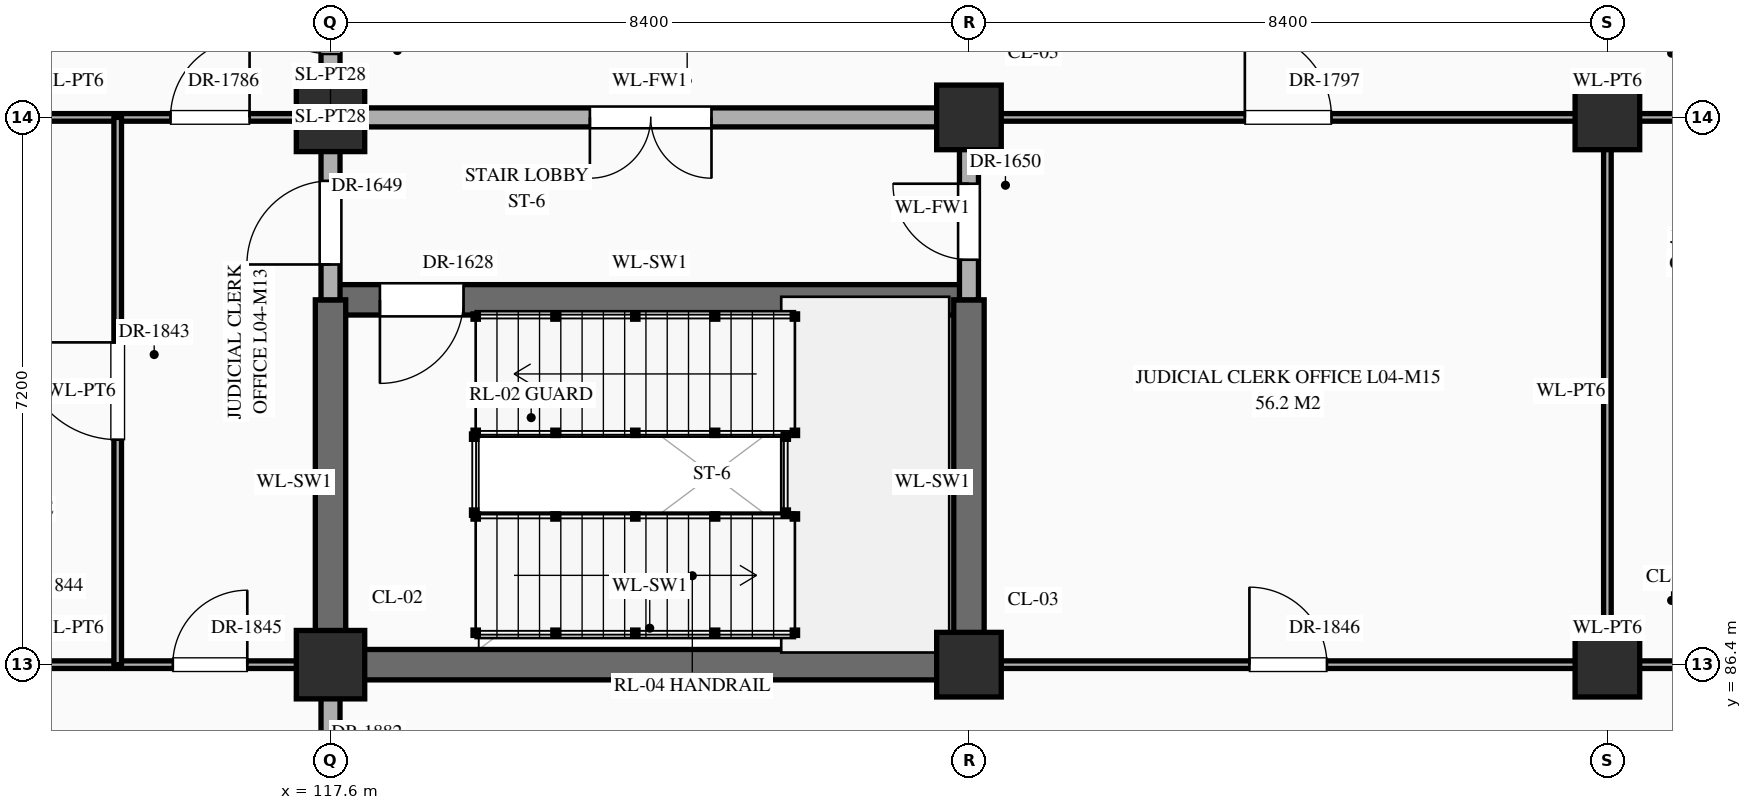
"""IFC4 building model, lengths in metres.
Left out: names, types, materials, properties, quantities, classifications, styles, units other than length and angle.
Written with IfcOpenShell. Run it as: python <this file> out.ifc"""

import sys

from ifc_helpers import new_model, si_unit, direction, frame, frame_2d, origin, origin_2d, place, context, subcontext, project, spatial, rectangle, extrude, element, fill, save


model = new_model("IFC4")
c1 = context("Model", 3, precision=1e-05, world=origin(), true_north=direction((0.0, 1.0)))
c2 = subcontext(c1, "Body", "Model", "MODEL_VIEW")
j1 = project(units=[si_unit("LENGTHUNIT", "METRE"), si_unit("PLANEANGLEUNIT", "RADIAN")], contexts=[c1])
p1 = place(None, origin())
s1 = spatial("IfcSite", under=j1, at=p1, CompositionType="ELEMENT")
p2 = place(p1, origin())
s2 = spatial("IfcBuilding", under=s1, at=p2, CompositionType="ELEMENT")
p3 = place(p2, frame((0.0, 0.0, 16.2)))
s3 = spatial("IfcBuildingStorey", under=s2, at=p3, CompositionType="ELEMENT", Elevation=16.2)
for number, where, z_axis, x_axis in (
    (1, (117.6, 86.4, 0.0), (0.0, 0.0, 1.0), (1.0, 0.0, 0.0)),
    (2, (117.6, 93.6, 0.0), (0.0, 0.0, 1.0), (1.0, 0.0, 0.0)),
):
    element("IfcColumn", number, at=place(p3, frame(where, z_axis=z_axis, x_axis=x_axis)), inside=s3, PredefinedType="COLUMN", context=c2, shape_type="SweptSolid", body=[
        extrude(rectangle(XDim=0.9, YDim=0.9, at=origin_2d()), origin(), (0.0, 0.0, 1.0), 5.4),
    ])
for number, where, z_axis, x_axis in (
    (3, (126.0, 86.4, 0.0), (0.0, 0.0, 1.0), (1.0, 0.0, 0.0)),
    (4, (126.0, 93.6, 0.0), (0.0, 0.0, 1.0), (1.0, 0.0, 0.0)),
    (5, (134.4, 86.4, 0.0), (0.0, 0.0, 1.0), (1.0, 0.0, 0.0)),
    (6, (134.4, 93.6, 0.0), (0.0, 0.0, 1.0), (1.0, 0.0, 0.0)),
):
    element("IfcColumn", number, at=place(p3, frame(where, z_axis=z_axis, x_axis=x_axis)), inside=s3, PredefinedType="COLUMN", context=c2, shape_type="SweptSolid", body=[
        extrude(rectangle(XDim=0.85, YDim=0.85, at=origin_2d()), origin(), (0.0, 0.0, 1.0), 5.4),
    ])
p4 = place(p3, frame((109.2, 86.4, 0.0), z_axis=(0.0, 0.0, 1.0), x_axis=(1.0, 0.0, 0.0)))
e7 = element("IfcWall", 7, at=p4, inside=s3, PredefinedType="STANDARD", context=c2, shape_type="SweptSolid", body=[
    extrude(rectangle(XDim=8.4, YDim=0.1, at=frame_2d((4.2, 0.0))), origin(), (0.0, 0.0, 1.0), 4.27),
])
p5 = place(p4, frame((0.965, 0.0, 0.0)))
e8 = element("IfcOpeningElement", 8, at=p5, cuts=e7, PredefinedType="OPENING", context=c2, shape_type="SweptSolid", body=[
    extrude(rectangle(XDim=1.24, YDim=2.3, at=frame_2d((0.62, 1.15))), frame((0.0, 0.062, 0.0), z_axis=(0.0, -1.0, 0.0), x_axis=(1.0, 0.0, 0.0)), (0.0, 0.0, 1.0), 0.124),
])
p6 = place(p4, frame((3.73, 0.0, 0.0)))
e9 = element("IfcOpeningElement", 9, at=p6, cuts=e7, PredefinedType="OPENING", context=c2, shape_type="SweptSolid", body=[
    extrude(rectangle(XDim=0.94, YDim=2.3, at=frame_2d((0.47, 1.15))), frame((0.0, 0.062, 0.0), z_axis=(0.0, -1.0, 0.0), x_axis=(1.0, 0.0, 0.0)), (0.0, 0.0, 1.0), 0.124),
])
p7 = place(p4, frame((6.325, 0.0, 0.0)))
e10 = element("IfcOpeningElement", 10, at=p7, cuts=e7, PredefinedType="OPENING", context=c2, shape_type="SweptSolid", body=[
    extrude(rectangle(XDim=0.98, YDim=2.35, at=frame_2d((0.49, 1.175))), frame((0.0, 0.062, 0.0), z_axis=(0.0, -1.0, 0.0), x_axis=(1.0, 0.0, 0.0)), (0.0, 0.0, 1.0), 0.124),
])
p8 = place(p3, frame((117.6, 86.4, 0.0), z_axis=(0.0, 0.0, 1.0), x_axis=(1.0, 0.0, 0.0)))
e11 = element("IfcWall", 11, at=p8, inside=s3, PredefinedType="SHEAR", context=c2, shape_type="SweptSolid", body=[
    extrude(rectangle(XDim=8.4, YDim=0.4, at=frame_2d((4.2, 0.0))), origin(), (0.0, 0.0, 1.0), 5.12),
])
p9 = place(p3, frame((126.0, 86.4, 0.0), z_axis=(0.0, 0.0, 1.0), x_axis=(1.0, 0.0, 0.0)))
e12 = element("IfcWall", 12, at=p9, inside=s3, PredefinedType="STANDARD", context=c2, shape_type="SweptSolid", body=[
    extrude(rectangle(XDim=16.8, YDim=0.1, at=frame_2d((8.4, 0.0))), origin(), (0.0, 0.0, 1.0), 4.27),
])
p10 = place(p9, frame((3.69, 0.0, 0.0)))
e13 = element("IfcOpeningElement", 13, at=p10, cuts=e12, PredefinedType="OPENING", context=c2, shape_type="SweptSolid", body=[
    extrude(rectangle(XDim=1.02, YDim=2.4, at=frame_2d((0.51, 1.2))), frame((0.0, 0.062, 0.0), z_axis=(0.0, -1.0, 0.0), x_axis=(1.0, 0.0, 0.0)), (0.0, 0.0, 1.0), 0.124),
])
p11 = place(p9, frame((9.403, 0.0, 0.0)))
e14 = element("IfcOpeningElement", 14, at=p11, cuts=e12, PredefinedType="OPENING", context=c2, shape_type="SweptSolid", body=[
    extrude(rectangle(XDim=1.14, YDim=2.4, at=frame_2d((0.57, 1.2))), frame((0.0, 0.062, 0.0), z_axis=(0.0, -1.0, 0.0), x_axis=(1.0, 0.0, 0.0)), (0.0, 0.0, 1.0), 0.124),
])
p12 = place(p9, frame((11.7, 0.0, 0.0)))
e15 = element("IfcOpeningElement", 15, at=p12, cuts=e12, PredefinedType="OPENING", context=c2, shape_type="SweptSolid", body=[
    extrude(rectangle(XDim=1.8, YDim=2.5, at=frame_2d((0.9, 1.25))), frame((0.0, 0.062, 0.0), z_axis=(0.0, -1.0, 0.0), x_axis=(1.0, 0.0, 0.0)), (0.0, 0.0, 1.0), 0.124),
])
p13 = place(p9, frame((14.768, 0.0, 0.0)))
e16 = element("IfcOpeningElement", 16, at=p13, cuts=e12, PredefinedType="OPENING", context=c2, shape_type="SweptSolid", body=[
    extrude(rectangle(XDim=0.92, YDim=2.15, at=frame_2d((0.46, 1.075))), frame((0.0, 0.062, 0.0), z_axis=(0.0, -1.0, 0.0), x_axis=(1.0, 0.0, 0.0)), (0.0, 0.0, 1.0), 0.124),
])
p14 = place(p3, frame((117.6, 91.2, 0.0), z_axis=(0.0, 0.0, 1.0), x_axis=(1.0, 0.0, 0.0)))
e17 = element("IfcWall", 17, at=p14, inside=s3, PredefinedType="SHEAR", context=c2, shape_type="SweptSolid", body=[
    extrude(rectangle(XDim=8.4, YDim=0.4, at=frame_2d((4.2, 0.0))), origin(), (0.0, 0.0, 1.0), 5.12),
])
p15 = place(p14, frame((0.65, 0.0, 0.0)))
e18 = element("IfcOpeningElement", 18, at=p15, cuts=e17, PredefinedType="OPENING", context=c2, shape_type="SweptSolid", body=[
    extrude(rectangle(XDim=1.1, YDim=2.2, at=frame_2d((0.55, 1.1))), frame((0.0, 0.212, 0.0), z_axis=(0.0, -1.0, 0.0), x_axis=(1.0, 0.0, 0.0)), (0.0, 0.0, 1.0), 0.424),
])
p16 = place(p3, frame((109.2, 93.6, 0.0), z_axis=(0.0, 0.0, 1.0), x_axis=(1.0, 0.0, 0.0)))
e19 = element("IfcWall", 19, at=p16, inside=s3, PredefinedType="STANDARD", context=c2, shape_type="SweptSolid", body=[
    extrude(rectangle(XDim=8.4, YDim=0.1, at=frame_2d((4.2, 0.0))), origin(), (0.0, 0.0, 1.0), 4.27),
])
p17 = place(p16, frame((1.105, 0.0, 0.0)))
e20 = element("IfcOpeningElement", 20, at=p17, cuts=e19, PredefinedType="OPENING", context=c2, shape_type="SweptSolid", body=[
    extrude(rectangle(XDim=0.96, YDim=2.2, at=frame_2d((0.48, 1.1))), frame((0.0, 0.062, 0.0), z_axis=(0.0, -1.0, 0.0), x_axis=(1.0, 0.0, 0.0)), (0.0, 0.0, 1.0), 0.124),
])
p18 = place(p16, frame((3.7, 0.0, 0.0)))
e21 = element("IfcOpeningElement", 21, at=p18, cuts=e19, PredefinedType="OPENING", context=c2, shape_type="SweptSolid", body=[
    extrude(rectangle(XDim=1.0, YDim=2.25, at=frame_2d((0.5, 1.125))), frame((0.0, 0.062, 0.0), z_axis=(0.0, -1.0, 0.0), x_axis=(1.0, 0.0, 0.0)), (0.0, 0.0, 1.0), 0.124),
])
p19 = place(p16, frame((6.295, 0.0, 0.0)))
e22 = element("IfcOpeningElement", 22, at=p19, cuts=e19, PredefinedType="OPENING", context=c2, shape_type="SweptSolid", body=[
    extrude(rectangle(XDim=1.04, YDim=2.2, at=frame_2d((0.52, 1.1))), frame((0.0, 0.062, 0.0), z_axis=(0.0, -1.0, 0.0), x_axis=(1.0, 0.0, 0.0)), (0.0, 0.0, 1.0), 0.124),
])
p20 = place(p3, frame((117.6, 93.6, 0.0), z_axis=(0.0, 0.0, 1.0), x_axis=(1.0, 0.0, 0.0)))
e23 = element("IfcWall", 23, at=p20, inside=s3, PredefinedType="STANDARD", context=c2, shape_type="SweptSolid", body=[
    extrude(rectangle(XDim=8.4, YDim=0.25, at=frame_2d((4.2, 0.0))), origin(), (0.0, 0.0, 1.0), 4.27),
])
p21 = place(p20, frame((3.413, 0.0, 0.0)))
e24 = element("IfcOpeningElement", 24, at=p21, cuts=e23, PredefinedType="OPENING", context=c2, shape_type="SweptSolid", body=[
    extrude(rectangle(XDim=1.6, YDim=2.3, at=frame_2d((0.8, 1.15))), frame((0.0, 0.137, 0.0), z_axis=(0.0, -1.0, 0.0), x_axis=(1.0, 0.0, 0.0)), (0.0, 0.0, 1.0), 0.274),
])
p22 = place(p3, frame((126.0, 93.6, 0.0), z_axis=(0.0, 0.0, 1.0), x_axis=(1.0, 0.0, 0.0)))
e25 = element("IfcWall", 25, at=p22, inside=s3, PredefinedType="STANDARD", context=c2, shape_type="SweptSolid", body=[
    extrude(rectangle(XDim=16.8, YDim=0.1, at=frame_2d((8.4, 0.0))), origin(), (0.0, 0.0, 1.0), 4.27),
])
p23 = place(p22, frame((3.63, 0.0, 0.0)))
e26 = element("IfcOpeningElement", 26, at=p23, cuts=e25, PredefinedType="OPENING", context=c2, shape_type="SweptSolid", body=[
    extrude(rectangle(XDim=1.14, YDim=2.4, at=frame_2d((0.57, 1.2))), frame((0.0, 0.062, 0.0), z_axis=(0.0, -1.0, 0.0), x_axis=(1.0, 0.0, 0.0)), (0.0, 0.0, 1.0), 0.124),
])
p24 = place(p22, frame((9.522, 0.0, 0.0)))
e27 = element("IfcOpeningElement", 27, at=p24, cuts=e25, PredefinedType="OPENING", context=c2, shape_type="SweptSolid", body=[
    extrude(rectangle(XDim=0.9, YDim=2.15, at=frame_2d((0.45, 1.075))), frame((0.0, 0.062, 0.0), z_axis=(0.0, -1.0, 0.0), x_axis=(1.0, 0.0, 0.0)), (0.0, 0.0, 1.0), 0.124),
])
p25 = place(p22, frame((11.75, 0.0, 0.0)))
e28 = element("IfcOpeningElement", 28, at=p25, cuts=e25, PredefinedType="OPENING", context=c2, shape_type="SweptSolid", body=[
    extrude(rectangle(XDim=1.7, YDim=2.45, at=frame_2d((0.85, 1.225))), frame((0.0, 0.062, 0.0), z_axis=(0.0, -1.0, 0.0), x_axis=(1.0, 0.0, 0.0)), (0.0, 0.0, 1.0), 0.124),
])
p26 = place(p22, frame((14.768, 0.0, 0.0)))
e29 = element("IfcOpeningElement", 29, at=p26, cuts=e25, PredefinedType="OPENING", context=c2, shape_type="SweptSolid", body=[
    extrude(rectangle(XDim=0.92, YDim=2.15, at=frame_2d((0.46, 1.075))), frame((0.0, 0.062, 0.0), z_axis=(0.0, -1.0, 0.0), x_axis=(1.0, 0.0, 0.0)), (0.0, 0.0, 1.0), 0.124),
])
p27 = place(p3, frame((114.8, 86.4, 0.0), z_axis=(0.0, 0.0, 1.0), x_axis=(0.0, 1.0, 0.0)))
e30 = element("IfcWall", 30, at=p27, inside=s3, PredefinedType="STANDARD", context=c2, shape_type="SweptSolid", body=[
    extrude(rectangle(XDim=7.2, YDim=0.1, at=frame_2d((3.6, 0.0))), origin(), (0.0, 0.0, 1.0), 5.12),
])
p28 = place(p27, frame((2.96, 0.0, 0.0)))
e31 = element("IfcOpeningElement", 31, at=p28, cuts=e30, PredefinedType="OPENING", context=c2, shape_type="SweptSolid", body=[
    extrude(rectangle(XDim=1.28, YDim=2.35, at=frame_2d((0.64, 1.175))), frame((0.0, 0.062, 0.0), z_axis=(0.0, -1.0, 0.0), x_axis=(1.0, 0.0, 0.0)), (0.0, 0.0, 1.0), 0.124),
])
p29 = place(p3, frame((117.6, 79.24, 0.0), z_axis=(0.0, 0.0, 1.0), x_axis=(0.0, 1.0, 0.0)))
e32 = element("IfcWall", 32, at=p29, inside=s3, PredefinedType="STANDARD", context=c2, shape_type="SweptSolid", body=[
    extrude(rectangle(XDim=7.16, YDim=0.25, at=frame_2d((3.58, 0.0))), origin(), (0.0, 0.0, 1.0), 4.37),
])
p30 = place(p29, frame((5.3, 0.0, 0.0)))
e33 = element("IfcOpeningElement", 33, at=p30, cuts=e32, PredefinedType="OPENING", context=c2, shape_type="SweptSolid", body=[
    extrude(rectangle(XDim=0.95, YDim=2.15, at=frame_2d((0.475, 1.075))), frame((0.0, 0.137, 0.0), z_axis=(0.0, -1.0, 0.0), x_axis=(1.0, 0.0, 0.0)), (0.0, 0.0, 1.0), 0.274),
])
p31 = place(p3, frame((117.6, 86.4, 0.0), z_axis=(0.0, 0.0, 1.0), x_axis=(0.0, 1.0, 0.0)))
e34 = element("IfcWall", 34, at=p31, inside=s3, PredefinedType="SHEAR", context=c2, shape_type="SweptSolid", body=[
    extrude(rectangle(XDim=4.8, YDim=0.4, at=frame_2d((2.4, 0.0))), origin(), (0.0, 0.0, 1.0), 5.12),
])
p32 = place(p3, frame((117.6, 91.2, 0.0), z_axis=(0.0, 0.0, 1.0), x_axis=(0.0, 1.0, 0.0)))
e35 = element("IfcWall", 35, at=p32, inside=s3, PredefinedType="STANDARD", context=c2, shape_type="SweptSolid", body=[
    extrude(rectangle(XDim=13.2, YDim=0.25, at=frame_2d((6.6, 0.0))), origin(), (0.0, 0.0, 1.0), 4.37),
])
p33 = place(p32, frame((0.465, 0.0, 0.0)))
e36 = element("IfcOpeningElement", 36, at=p33, cuts=e35, PredefinedType="OPENING", context=c2, shape_type="SweptSolid", body=[
    extrude(rectangle(XDim=1.1, YDim=2.2, at=frame_2d((0.55, 1.1))), frame((0.0, 0.137, 0.0), z_axis=(0.0, -1.0, 0.0), x_axis=(1.0, 0.0, 0.0)), (0.0, 0.0, 1.0), 0.274),
])
p34 = place(p32, frame((10.51, 0.0, 0.0)))
e37 = element("IfcOpeningElement", 37, at=p34, cuts=e35, PredefinedType="OPENING", context=c2, shape_type="SweptSolid", body=[
    extrude(rectangle(XDim=0.95, YDim=2.15, at=frame_2d((0.475, 1.075))), frame((0.0, 0.137, 0.0), z_axis=(0.0, -1.0, 0.0), x_axis=(1.0, 0.0, 0.0)), (0.0, 0.0, 1.0), 0.274),
])
p35 = place(p32, frame((3.235, 0.0, 0.0)))
e38 = element("IfcOpeningElement", 38, at=p35, cuts=e35, PredefinedType="OPENING", context=c2, shape_type="SweptSolid", body=[
    extrude(rectangle(XDim=1.1, YDim=2.2, at=frame_2d((0.55, 1.1))), frame((0.0, 0.137, 0.0), z_axis=(0.0, -1.0, 0.0), x_axis=(1.0, 0.0, 0.0)), (0.0, 0.0, 1.0), 0.274),
])
p36 = place(p3, frame((126.0, 86.4, 0.0), z_axis=(0.0, 0.0, 1.0), x_axis=(0.0, 1.0, 0.0)))
e39 = element("IfcWall", 39, at=p36, inside=s3, PredefinedType="SHEAR", context=c2, shape_type="SweptSolid", body=[
    extrude(rectangle(XDim=4.8, YDim=0.4, at=frame_2d((2.4, 0.0))), origin(), (0.0, 0.0, 1.0), 5.12),
])
p37 = place(p3, frame((126.0, 91.2, 0.0), z_axis=(0.0, 0.0, 1.0), x_axis=(0.0, 1.0, 0.0)))
e40 = element("IfcWall", 40, at=p37, inside=s3, PredefinedType="STANDARD", context=c2, shape_type="SweptSolid", body=[
    extrude(rectangle(XDim=2.4, YDim=0.25, at=frame_2d((1.2, 0.0))), origin(), (0.0, 0.0, 1.0), 4.37),
])
p38 = place(p37, frame((0.528, 0.0, 0.0)))
e41 = element("IfcOpeningElement", 41, at=p38, cuts=e40, PredefinedType="OPENING", context=c2, shape_type="SweptSolid", body=[
    extrude(rectangle(XDim=1.0, YDim=2.2, at=frame_2d((0.5, 1.1))), frame((0.0, 0.137, 0.0), z_axis=(0.0, -1.0, 0.0), x_axis=(1.0, 0.0, 0.0)), (0.0, 0.0, 1.0), 0.274),
])
p39 = place(p3, frame((134.4, 86.4, 0.0), z_axis=(0.0, 0.0, 1.0), x_axis=(0.0, 1.0, 0.0)))
e42 = element("IfcWall", 42, at=p39, inside=s3, PredefinedType="STANDARD", context=c2, shape_type="SweptSolid", body=[
    extrude(rectangle(XDim=7.2, YDim=0.1, at=frame_2d((3.6, 0.0))), origin(), (0.0, 0.0, 1.0), 4.37),
])
p40 = place(p15, frame((1.1, 0.0, 0.0), z_axis=(0.0, 0.0, 1.0), x_axis=(-1.0, 0.0, 0.0)))
e43 = element("IfcDoor", 43, at=p40, inside=s3, OperationType="SINGLE_SWING_RIGHT", PredefinedType="DOOR", context=c2, shape_type="SweptSolid", body=[
    extrude(rectangle(XDim=1.1, YDim=2.2, at=frame_2d((0.55, 1.1))), frame((0.0, 0.025, 0.0), z_axis=(0.0, -1.0, 0.0), x_axis=(1.0, 0.0, 0.0)), (0.0, 0.0, 1.0), 0.05),
])
fill(e18, e43)
p41 = place(p21, frame((1.6, 0.0, 0.0), z_axis=(0.0, 0.0, 1.0), x_axis=(-1.0, 0.0, 0.0)))
e44 = element("IfcDoor", 44, at=p41, inside=s3, OperationType="DOUBLE_DOOR_SINGLE_SWING", PredefinedType="DOOR", context=c2, shape_type="SweptSolid", body=[
    extrude(rectangle(XDim=1.6, YDim=2.3, at=frame_2d((0.8, 1.15))), frame((0.0, 0.025, 0.0), z_axis=(0.0, -1.0, 0.0), x_axis=(1.0, 0.0, 0.0)), (0.0, 0.0, 1.0), 0.05),
])
fill(e24, e44)
p42 = place(p33, origin())
e45 = element("IfcDoor", 45, at=p42, inside=s3, OperationType="SINGLE_SWING_LEFT", PredefinedType="DOOR", context=c2, shape_type="SweptSolid", body=[
    extrude(rectangle(XDim=1.1, YDim=2.2, at=frame_2d((0.55, 1.1))), frame((0.0, 0.025, 0.0), z_axis=(0.0, -1.0, 0.0), x_axis=(1.0, 0.0, 0.0)), (0.0, 0.0, 1.0), 0.05),
])
fill(e36, e45)
p43 = place(p38, origin())
e46 = element("IfcDoor", 46, at=p43, inside=s3, OperationType="SINGLE_SWING_RIGHT", PredefinedType="DOOR", context=c2, shape_type="SweptSolid", body=[
    extrude(rectangle(XDim=1.0, YDim=2.2, at=frame_2d((0.5, 1.1))), frame((0.0, 0.025, 0.0), z_axis=(0.0, -1.0, 0.0), x_axis=(1.0, 0.0, 0.0)), (0.0, 0.0, 1.0), 0.05),
])
fill(e41, e46)
p44 = place(p35, origin())
e47 = element("IfcDoor", 47, at=p44, inside=s3, OperationType="SINGLE_SWING_RIGHT", PredefinedType="DOOR", context=c2, shape_type="SweptSolid", body=[
    extrude(rectangle(XDim=1.1, YDim=2.2, at=frame_2d((0.55, 1.1))), frame((0.0, 0.025, 0.0), z_axis=(0.0, -1.0, 0.0), x_axis=(1.0, 0.0, 0.0)), (0.0, 0.0, 1.0), 0.05),
])
fill(e38, e47)
p45 = place(p19, origin())
e48 = element("IfcDoor", 48, at=p45, inside=s3, OperationType="SINGLE_SWING_RIGHT", PredefinedType="DOOR", context=c2, shape_type="SweptSolid", body=[
    extrude(rectangle(XDim=1.04, YDim=2.2, at=frame_2d((0.52, 1.1))), frame((0.0, 0.025, 0.0), z_axis=(0.0, -1.0, 0.0), x_axis=(1.0, 0.0, 0.0)), (0.0, 0.0, 1.0), 0.05),
])
fill(e22, e48)
p46 = place(p23, origin())
e49 = element("IfcDoor", 49, at=p46, inside=s3, OperationType="SINGLE_SWING_LEFT", PredefinedType="DOOR", context=c2, shape_type="SweptSolid", body=[
    extrude(rectangle(XDim=1.14, YDim=2.4, at=frame_2d((0.57, 1.2))), frame((0.0, 0.025, 0.0), z_axis=(0.0, -1.0, 0.0), x_axis=(1.0, 0.0, 0.0)), (0.0, 0.0, 1.0), 0.05),
])
fill(e26, e49)
p47 = place(p28, origin())
e50 = element("IfcDoor", 50, at=p47, inside=s3, OperationType="SINGLE_SWING_RIGHT", PredefinedType="DOOR", context=c2, shape_type="SweptSolid", body=[
    extrude(rectangle(XDim=1.28, YDim=2.35, at=frame_2d((0.64, 1.175))), frame((0.0, 0.025, 0.0), z_axis=(0.0, -1.0, 0.0), x_axis=(1.0, 0.0, 0.0)), (0.0, 0.0, 1.0), 0.05),
])
fill(e31, e50)
p48 = place(p7, origin())
e51 = element("IfcDoor", 51, at=p48, inside=s3, OperationType="SINGLE_SWING_RIGHT", PredefinedType="DOOR", context=c2, shape_type="SweptSolid", body=[
    extrude(rectangle(XDim=0.98, YDim=2.35, at=frame_2d((0.49, 1.175))), frame((0.0, 0.025, 0.0), z_axis=(0.0, -1.0, 0.0), x_axis=(1.0, 0.0, 0.0)), (0.0, 0.0, 1.0), 0.05),
])
fill(e10, e51)
p49 = place(p10, origin())
e52 = element("IfcDoor", 52, at=p49, inside=s3, OperationType="SINGLE_SWING_LEFT", PredefinedType="DOOR", context=c2, shape_type="SweptSolid", body=[
    extrude(rectangle(XDim=1.02, YDim=2.4, at=frame_2d((0.51, 1.2))), frame((0.0, 0.025, 0.0), z_axis=(0.0, -1.0, 0.0), x_axis=(1.0, 0.0, 0.0)), (0.0, 0.0, 1.0), 0.05),
])
fill(e13, e52)
save(model, sys.argv[1])
